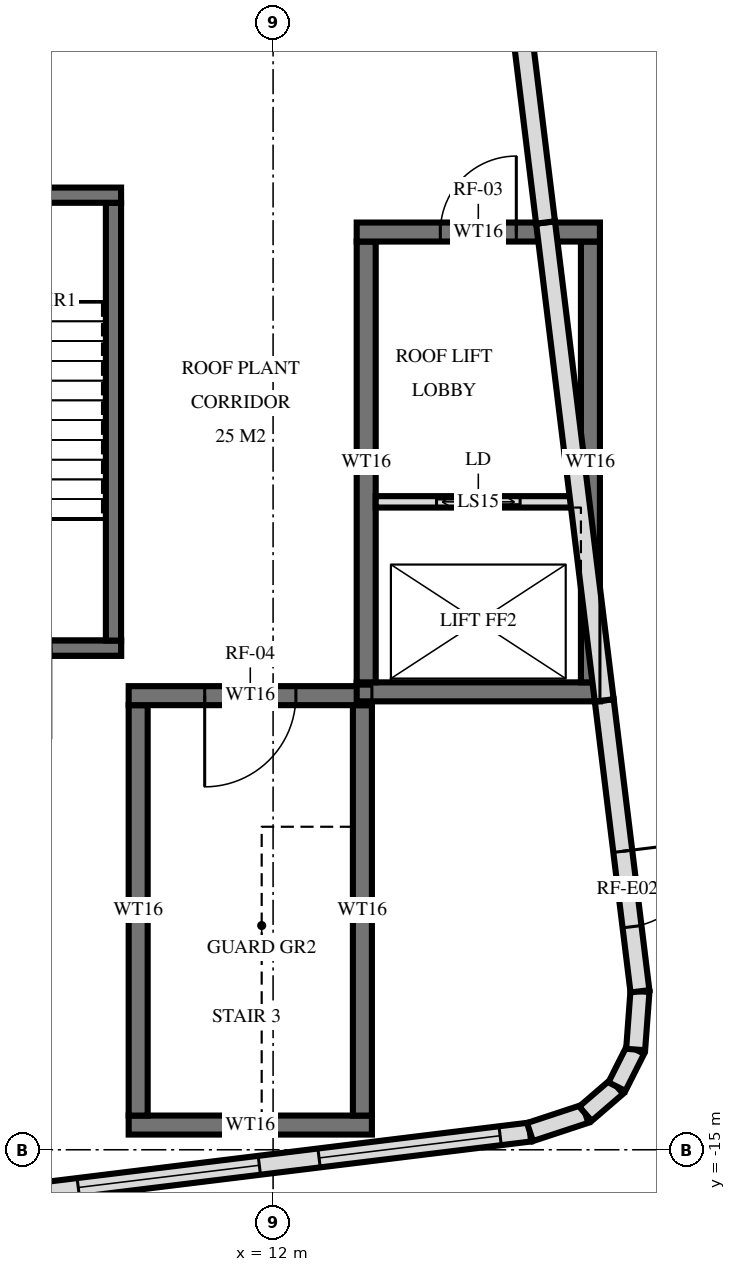
"""IFC4 building model, lengths in metres.
Left out: names, types, materials, properties, quantities, classifications, styles, units other than length and angle.
Written with IfcOpenShell. Run it as: python <this file> out.ifc"""

import sys

from ifc_helpers import new_model, si_unit, direction, frame, frame_2d, origin, place, context, subcontext, project, spatial, rectangle, extrude, element, fill, save


model = new_model("IFC4")
c1 = context("Model", 3, precision=1e-05, world=origin(), true_north=direction((0.0, 1.0)))
c2 = subcontext(c1, "Body", "Model", "MODEL_VIEW")
j1 = project(units=[si_unit("LENGTHUNIT", "METRE"), si_unit("PLANEANGLEUNIT", "RADIAN")], contexts=[c1])
p1 = place(None, origin())
s1 = spatial("IfcSite", under=j1, at=p1, CompositionType="ELEMENT")
p2 = place(p1, origin())
s2 = spatial("IfcBuilding", under=s1, at=p2, CompositionType="ELEMENT")
p3 = place(p2, frame((0.0, 0.0, 363.4)))
s3 = spatial("IfcBuildingStorey", under=s2, at=p3, CompositionType="ELEMENT", Elevation=363.4)
p4 = place(p3, frame((10.1, -9.025, 0.0), z_axis=(0.0, 0.0, 1.0), x_axis=(1.0, 0.0, 0.0)))
e1 = element("IfcWall", 1, at=p4, inside=s3, PredefinedType="SHEAR", context=c2, shape_type="SweptSolid", body=[
    extrude(rectangle(XDim=3.2, YDim=0.25, at=frame_2d((1.6, 0.0))), origin(), (0.0, 0.0, 1.0), 3.0),
])
p5 = place(p4, frame((1.0, 0.0, 0.0)))
e2 = element("IfcOpeningElement", 2, at=p5, cuts=e1, PredefinedType="OPENING", context=c2, shape_type="SweptSolid", body=[
    extrude(rectangle(XDim=1.2, YDim=2.1, at=frame_2d((0.6, 1.05))), frame((0.0, 0.135, 0.0), z_axis=(0.0, -1.0, 0.0), x_axis=(1.0, 0.0, 0.0)), (0.0, 0.0, 1.0), 0.27),
])
p6 = place(p3, frame((10.1, -14.675, 0.0), z_axis=(0.0, 0.0, 1.0), x_axis=(1.0, 0.0, 0.0)))
e3 = element("IfcWall", 3, at=p6, inside=s3, PredefinedType="SHEAR", context=c2, shape_type="SweptSolid", body=[
    extrude(rectangle(XDim=3.2, YDim=0.25, at=frame_2d((1.6, 0.0))), origin(), (0.0, 0.0, 1.0), 3.0),
])
for number, where, z_axis, x_axis in (
    (4, (10.225, -14.55, 0.0), (0.0, 0.0, 1.0), (0.0, 1.0, 0.0)),
    (5, (13.175, -14.55, 0.0), (0.0, 0.0, 1.0), (0.0, 1.0, 0.0)),
):
    element("IfcWall", number, at=place(p3, frame(where, z_axis=z_axis, x_axis=x_axis)), inside=s3, PredefinedType="SHEAR", context=c2, shape_type="SweptSolid", body=[
        extrude(rectangle(XDim=5.4, YDim=0.25, at=frame_2d((2.7, 0.0))), origin(), (0.0, 0.0, 1.0), 3.0),
    ])
p7 = place(p3, frame((13.1, -2.925, 0.0), z_axis=(0.0, 0.0, 1.0), x_axis=(1.0, 0.0, 0.0)))
e6 = element("IfcWall", 6, at=p7, inside=s3, PredefinedType="SHEAR", context=c2, shape_type="SweptSolid", body=[
    extrude(rectangle(XDim=3.2, YDim=0.25, at=frame_2d((1.6, 0.0))), origin(), (0.0, 0.0, 1.0), 5.0),
])
p8 = place(p7, frame((1.1, 0.0, 0.0)))
e7 = element("IfcOpeningElement", 7, at=p8, cuts=e6, PredefinedType="OPENING", context=c2, shape_type="SweptSolid", body=[
    extrude(rectangle(XDim=1.0, YDim=2.1, at=frame_2d((0.5, 1.05))), frame((0.0, 0.135, 0.0), z_axis=(0.0, -1.0, 0.0), x_axis=(1.0, 0.0, 0.0)), (0.0, 0.0, 1.0), 0.27),
])
p9 = place(p3, frame((13.1, -8.975, 0.0), z_axis=(0.0, 0.0, 1.0), x_axis=(1.0, 0.0, 0.0)))
e8 = element("IfcWall", 8, at=p9, inside=s3, PredefinedType="SHEAR", context=c2, shape_type="SweptSolid", body=[
    extrude(rectangle(XDim=3.2, YDim=0.25, at=frame_2d((1.6, 0.0))), origin(), (0.0, 0.0, 1.0), 5.0),
])
for number, where, z_axis, x_axis in (
    (9, (13.225, -8.85, 0.0), (0.0, 0.0, 1.0), (0.0, 1.0, 0.0)),
    (10, (16.175, -8.85, 0.0), (0.0, 0.0, 1.0), (0.0, 1.0, 0.0)),
):
    element("IfcWall", number, at=place(p3, frame(where, z_axis=z_axis, x_axis=x_axis)), inside=s3, PredefinedType="SHEAR", context=c2, shape_type="SweptSolid", body=[
        extrude(rectangle(XDim=5.8, YDim=0.25, at=frame_2d((2.9, 0.0))), origin(), (0.0, 0.0, 1.0), 5.0),
    ])
p10 = place(p3, frame((14.984, 2.091, 0.0), z_axis=(0.0, 0.0, 1.0), x_axis=(0.121857042325, -0.992547661947, 0.0)))
e11 = element("IfcWall", 11, at=p10, inside=s3, PredefinedType="SOLIDWALL", context=c2, shape_type="SweptSolid", body=[
    extrude(rectangle(XDim=4.927, YDim=0.25, at=frame_2d((2.463, 0.0))), origin(), (0.0, 0.0, 1.0), 12.0),
])
p11 = place(p10, frame((0.75, 0.0, 0.0)))
e12 = element("IfcOpeningElement", 12, at=p11, cuts=e11, PredefinedType="OPENING", context=c2, shape_type="SweptSolid", body=[
    extrude(rectangle(XDim=1.0, YDim=2.1, at=frame_2d((0.5, 1.05))), frame((0.0, 0.135, 0.0), z_axis=(0.0, -1.0, 0.0), x_axis=(1.0, 0.0, 0.0)), (0.0, 0.0, 1.0), 0.27),
])
p12 = place(p3, frame((16.357, -9.087, 0.0), z_axis=(0.0, 0.0, 1.0), x_axis=(0.1219306912, -0.992538617155, 0.0)))
e13 = element("IfcWall", 13, at=p12, inside=s3, PredefinedType="SOLIDWALL", context=c2, shape_type="SweptSolid", body=[
    extrude(rectangle(XDim=3.856, YDim=0.25, at=frame_2d((1.928, 0.0))), origin(), (0.0, 0.0, 1.0), 12.0),
])
p13 = place(p12, frame((2.0, 0.0, 0.0)))
e14 = element("IfcOpeningElement", 14, at=p13, cuts=e13, PredefinedType="OPENING", context=c2, shape_type="SweptSolid", body=[
    extrude(rectangle(XDim=1.0, YDim=2.1, at=frame_2d((0.5, 1.05))), frame((0.0, 0.135, 0.0), z_axis=(0.0, -1.0, 0.0), x_axis=(1.0, 0.0, 0.0)), (0.0, 0.0, 1.0), 0.27),
])
p14 = place(p3, frame((16.827, -12.915, 0.0), z_axis=(0.0, 0.0, 1.0), x_axis=(-0.074070751166, -0.997252988876, 0.0)))
e15 = element("IfcWall", 15, at=p14, inside=s3, PredefinedType="SOLIDWALL", context=c2, shape_type="SweptSolid", body=[
    extrude(rectangle(XDim=0.768, YDim=0.25, at=frame_2d((0.384, 0.0))), origin(), (0.0, 0.0, 1.0), 12.0),
])
p15 = place(p3, frame((16.77, -13.681, 0.0), z_axis=(0.0, 0.0, 1.0), x_axis=(-0.450424839649, -0.892814350146, 0.0)))
e16 = element("IfcWall", 16, at=p15, inside=s3, PredefinedType="SOLIDWALL", context=c2, shape_type="SweptSolid", body=[
    extrude(rectangle(XDim=0.547, YDim=0.25, at=frame_2d((0.273, 0.0))), origin(), (0.0, 0.0, 1.0), 12.0),
])
p16 = place(p3, frame((16.524, -14.169, 0.0), z_axis=(0.0, 0.0, 1.0), x_axis=(-0.757394739228, -0.652957279605, 0.0)))
e17 = element("IfcWall", 17, at=p16, inside=s3, PredefinedType="SOLIDWALL", context=c2, shape_type="SweptSolid", body=[
    extrude(rectangle(XDim=0.547, YDim=0.25, at=frame_2d((0.273, 0.0))), origin(), (0.0, 0.0, 1.0), 12.0),
])
p17 = place(p3, frame((16.109, -14.526, 0.0), z_axis=(0.0, 0.0, 1.0), x_axis=(-0.949726974671, -0.313079340713, 0.0)))
e18 = element("IfcWall", 18, at=p17, inside=s3, PredefinedType="SOLIDWALL", context=c2, shape_type="SweptSolid", body=[
    extrude(rectangle(XDim=0.768, YDim=0.25, at=frame_2d((0.384, 0.0))), origin(), (0.0, 0.0, 1.0), 12.0),
])
p18 = place(p3, frame((15.38, -14.767, 0.0), z_axis=(0.0, 0.0, 1.0), x_axis=(-0.992546810088, -0.121863980664, 0.0)))
e19 = element("IfcWall", 19, at=p18, inside=s3, PredefinedType="SOLIDWALL", context=c2, shape_type="SweptSolid", body=[
    extrude(rectangle(XDim=28.727, YDim=0.25, at=frame_2d((14.363, 0.0))), origin(), (0.0, 0.0, 1.0), 12.0),
])
p19 = place(p18, frame((0.396, 0.0, 1.0)))
e20 = element("IfcOpeningElement", 20, at=p19, cuts=e19, PredefinedType="OPENING", context=c2, shape_type="SweptSolid", body=[
    extrude(rectangle(XDim=2.4, YDim=9.0, at=frame_2d((1.2, 4.5))), frame((0.0, 0.135, 0.0), z_axis=(0.0, -1.0, 0.0), x_axis=(1.0, 0.0, 0.0)), (0.0, 0.0, 1.0), 0.27),
])
p20 = place(p18, frame((3.588, 0.0, 1.0)))
e21 = element("IfcOpeningElement", 21, at=p20, cuts=e19, PredefinedType="OPENING", context=c2, shape_type="SweptSolid", body=[
    extrude(rectangle(XDim=2.4, YDim=9.0, at=frame_2d((1.2, 4.5))), frame((0.0, 0.135, 0.0), z_axis=(0.0, -1.0, 0.0), x_axis=(1.0, 0.0, 0.0)), (0.0, 0.0, 1.0), 0.27),
])
p21 = place(p18, frame((6.78, 0.0, 1.0)))
e22 = element("IfcOpeningElement", 22, at=p21, cuts=e19, PredefinedType="OPENING", context=c2, shape_type="SweptSolid", body=[
    extrude(rectangle(XDim=2.4, YDim=9.0, at=frame_2d((1.2, 4.5))), frame((0.0, 0.135, 0.0), z_axis=(0.0, -1.0, 0.0), x_axis=(1.0, 0.0, 0.0)), (0.0, 0.0, 1.0), 0.27),
])
p22 = place(p18, frame((9.971, 0.0, 1.0)))
e23 = element("IfcOpeningElement", 23, at=p22, cuts=e19, PredefinedType="OPENING", context=c2, shape_type="SweptSolid", body=[
    extrude(rectangle(XDim=2.4, YDim=9.0, at=frame_2d((1.2, 4.5))), frame((0.0, 0.135, 0.0), z_axis=(0.0, -1.0, 0.0), x_axis=(1.0, 0.0, 0.0)), (0.0, 0.0, 1.0), 0.27),
])
p23 = place(p18, frame((13.163, 0.0, 1.0)))
e24 = element("IfcOpeningElement", 24, at=p23, cuts=e19, PredefinedType="OPENING", context=c2, shape_type="SweptSolid", body=[
    extrude(rectangle(XDim=2.4, YDim=9.0, at=frame_2d((1.2, 4.5))), frame((0.0, 0.135, 0.0), z_axis=(0.0, -1.0, 0.0), x_axis=(1.0, 0.0, 0.0)), (0.0, 0.0, 1.0), 0.27),
])
p24 = place(p18, frame((16.355, 0.0, 1.0)))
e25 = element("IfcOpeningElement", 25, at=p24, cuts=e19, PredefinedType="OPENING", context=c2, shape_type="SweptSolid", body=[
    extrude(rectangle(XDim=2.4, YDim=9.0, at=frame_2d((1.2, 4.5))), frame((0.0, 0.135, 0.0), z_axis=(0.0, -1.0, 0.0), x_axis=(1.0, 0.0, 0.0)), (0.0, 0.0, 1.0), 0.27),
])
p25 = place(p18, frame((19.547, 0.0, 1.0)))
e26 = element("IfcOpeningElement", 26, at=p25, cuts=e19, PredefinedType="OPENING", context=c2, shape_type="SweptSolid", body=[
    extrude(rectangle(XDim=2.4, YDim=9.0, at=frame_2d((1.2, 4.5))), frame((0.0, 0.135, 0.0), z_axis=(0.0, -1.0, 0.0), x_axis=(1.0, 0.0, 0.0)), (0.0, 0.0, 1.0), 0.27),
])
p26 = place(p18, frame((22.739, 0.0, 1.0)))
e27 = element("IfcOpeningElement", 27, at=p26, cuts=e19, PredefinedType="OPENING", context=c2, shape_type="SweptSolid", body=[
    extrude(rectangle(XDim=2.4, YDim=9.0, at=frame_2d((1.2, 4.5))), frame((0.0, 0.135, 0.0), z_axis=(0.0, -1.0, 0.0), x_axis=(1.0, 0.0, 0.0)), (0.0, 0.0, 1.0), 0.27),
])
p27 = place(p18, frame((25.931, 0.0, 1.0)))
e28 = element("IfcOpeningElement", 28, at=p27, cuts=e19, PredefinedType="OPENING", context=c2, shape_type="SweptSolid", body=[
    extrude(rectangle(XDim=2.4, YDim=9.0, at=frame_2d((1.2, 4.5))), frame((0.0, 0.135, 0.0), z_axis=(0.0, -1.0, 0.0), x_axis=(1.0, 0.0, 0.0)), (0.0, 0.0, 1.0), 0.27),
])
p28 = place(p3, frame((15.585, -2.799, 5.25), z_axis=(0.0, 0.0, 1.0), x_axis=(0.121848010756, -0.992548770729, 0.0)))
e29 = element("IfcWall", 29, at=p28, inside=s3, PredefinedType="SOLIDWALL", context=c2, shape_type="SweptSolid", body=[
    extrude(rectangle(XDim=6.335, YDim=0.25, at=frame_2d((3.168, 0.0))), origin(), (0.0, 0.0, 1.0), 6.75),
])
p29 = place(p3, frame((17.019, 2.547, 0.0), z_axis=(0.0, 0.0, 1.0), x_axis=(0.12187092039, -0.992545958011, 0.0)))
e30 = element("IfcWall", 30, at=p29, inside=s3, PredefinedType="PARAPET", context=c2, shape_type="SweptSolid", body=[
    extrude(rectangle(XDim=15.527, YDim=0.25, at=frame_2d((7.764, 0.0))), origin(), (0.0, 0.0, 1.0), 1.1),
])
p30 = place(p3, frame((13.35, -6.475, 0.0), z_axis=(0.0, 0.0, 1.0), x_axis=(1.0, 0.0, 0.0)))
e31 = element("IfcWall", 31, at=p30, inside=s3, PredefinedType="PARTITIONING", context=c2, shape_type="SweptSolid", body=[
    extrude(rectangle(XDim=2.7, YDim=0.15, at=frame_2d((1.35, 0.0))), origin(), (0.0, 0.0, 1.0), 5.0),
])
p31 = place(p30, frame((0.8, 0.0, 0.0)))
e32 = element("IfcOpeningElement", 32, at=p31, cuts=e31, PredefinedType="OPENING", context=c2, shape_type="SweptSolid", body=[
    extrude(rectangle(XDim=1.1, YDim=2.1, at=frame_2d((0.55, 1.05))), frame((0.0, 0.085, 0.0), z_axis=(0.0, -1.0, 0.0), x_axis=(1.0, 0.0, 0.0)), (0.0, 0.0, 1.0), 0.17),
])
p32 = place(p3, frame((9.9, -8.3, 0.0), z_axis=(0.0, 0.0, 1.0), x_axis=(0.0, 1.0, 0.0)))
e33 = element("IfcWall", 33, at=p32, inside=s3, PredefinedType="SHEAR", context=c2, shape_type="SweptSolid", body=[
    extrude(rectangle(XDim=5.76, YDim=0.2, at=frame_2d((2.88, 0.0))), origin(), (0.0, 0.0, 1.0), 14.9),
])
p33 = place(p3, frame((6.95, -2.44, 0.0), z_axis=(0.0, 0.0, 1.0), x_axis=(1.0, 0.0, 0.0)))
e34 = element("IfcWall", 34, at=p33, inside=s3, PredefinedType="SHEAR", context=c2, shape_type="SweptSolid", body=[
    extrude(rectangle(XDim=3.05, YDim=0.2, at=frame_2d((1.525, 0.0))), origin(), (0.0, 0.0, 1.0), 14.9),
])
p34 = place(p3, frame((6.95, -8.4, 0.0), z_axis=(0.0, 0.0, 1.0), x_axis=(1.0, 0.0, 0.0)))
e35 = element("IfcWall", 35, at=p34, inside=s3, PredefinedType="SHEAR", context=c2, shape_type="SweptSolid", body=[
    extrude(rectangle(XDim=3.05, YDim=0.2, at=frame_2d((1.525, 0.0))), origin(), (0.0, 0.0, 1.0), 12.2),
])
p35 = place(p34, frame((0.925, 0.0, 0.0)))
e36 = element("IfcOpeningElement", 36, at=p35, cuts=e35, PredefinedType="OPENING", context=c2, shape_type="SweptSolid", body=[
    extrude(rectangle(XDim=1.2, YDim=2.1, at=frame_2d((0.6, 1.05))), frame((0.0, 0.11, 0.0), z_axis=(0.0, -1.0, 0.0), x_axis=(1.0, 0.0, 0.0)), (0.0, 0.0, 1.0), 0.22),
])
p36 = place(p3, frame((6.95, -8.4, 12.2), z_axis=(0.0, 0.0, 1.0), x_axis=(1.0, 0.0, 0.0)))
e37 = element("IfcWall", 37, at=p36, inside=s3, PredefinedType="SHEAR", context=c2, shape_type="SweptSolid", body=[
    extrude(rectangle(XDim=3.05, YDim=0.2, at=frame_2d((1.525, 0.0))), origin(), (0.0, 0.0, 1.0), 2.7),
])
p37 = place(p36, frame((0.925, 0.0, 0.0)))
e38 = element("IfcOpeningElement", 38, at=p37, cuts=e37, PredefinedType="OPENING", context=c2, shape_type="SweptSolid", body=[
    extrude(rectangle(XDim=1.2, YDim=2.1, at=frame_2d((0.6, 1.05))), frame((0.0, 0.11, 0.0), z_axis=(0.0, -1.0, 0.0), x_axis=(1.0, 0.0, 0.0)), (0.0, 0.0, 1.0), 0.22),
])
p38 = place(p19, origin())
e39 = element("IfcWindow", 39, at=p38, inside=s3, PartitioningType="SINGLE_PANEL", PredefinedType="USERDEFINED", context=c2, shape_type="SweptSolid", body=[
    extrude(rectangle(XDim=2.4, YDim=9.0, at=frame_2d((1.2, 4.5))), frame((0.0, 0.03, 0.0), z_axis=(0.0, -1.0, 0.0), x_axis=(1.0, 0.0, 0.0)), (0.0, 0.0, 1.0), 0.06),
])
fill(e20, e39)
p39 = place(p20, origin())
e40 = element("IfcWindow", 40, at=p39, inside=s3, PartitioningType="SINGLE_PANEL", PredefinedType="USERDEFINED", context=c2, shape_type="SweptSolid", body=[
    extrude(rectangle(XDim=2.4, YDim=9.0, at=frame_2d((1.2, 4.5))), frame((0.0, 0.03, 0.0), z_axis=(0.0, -1.0, 0.0), x_axis=(1.0, 0.0, 0.0)), (0.0, 0.0, 1.0), 0.06),
])
fill(e21, e40)
p40 = place(p13, origin())
e41 = element("IfcDoor", 41, at=p40, inside=s3, OperationType="SINGLE_SWING_RIGHT", PredefinedType="DOOR", context=c2, shape_type="SweptSolid", body=[
    extrude(rectangle(XDim=1.0, YDim=2.1, at=frame_2d((0.5, 1.05))), frame((0.0, 0.025, 0.0), z_axis=(0.0, -1.0, 0.0), x_axis=(1.0, 0.0, 0.0)), (0.0, 0.0, 1.0), 0.05),
])
fill(e14, e41)
p41 = place(p31, origin())
e42 = element("IfcDoor", 42, at=p41, inside=s3, OperationType="DOUBLE_DOOR_SLIDING", PredefinedType="USERDEFINED", context=c2, shape_type="SweptSolid", body=[
    extrude(rectangle(XDim=1.1, YDim=2.1, at=frame_2d((0.55, 1.05))), frame((0.0, 0.025, 0.0), z_axis=(0.0, -1.0, 0.0), x_axis=(1.0, 0.0, 0.0)), (0.0, 0.0, 1.0), 0.05),
])
fill(e32, e42)
p42 = place(p8, origin())
e43 = element("IfcDoor", 43, at=p42, inside=s3, OperationType="SINGLE_SWING_LEFT", PredefinedType="DOOR", context=c2, shape_type="SweptSolid", body=[
    extrude(rectangle(XDim=1.0, YDim=2.1, at=frame_2d((0.5, 1.05))), frame((0.0, 0.025, 0.0), z_axis=(0.0, -1.0, 0.0), x_axis=(1.0, 0.0, 0.0)), (0.0, 0.0, 1.0), 0.05),
])
fill(e7, e43)
p43 = place(p5, frame((0.6, 0.0, 0.0), z_axis=(0.0, 0.0, 1.0), x_axis=(-1.0, 0.0, 0.0)))
e44 = element("IfcDoor", 44, at=p43, inside=s3, OperationType="SINGLE_SWING_LEFT", PredefinedType="DOOR", context=c2, shape_type="SweptSolid", body=[
    extrude(rectangle(XDim=1.2, YDim=2.1, at=frame_2d((0.0, 1.05))), frame((0.0, -0.025, 0.0), z_axis=(0.0, 1.0, 0.0), x_axis=(-1.0, 0.0, 0.0)), (0.0, 0.0, 1.0), 0.05),
])
fill(e2, e44)
save(model, sys.argv[1])
